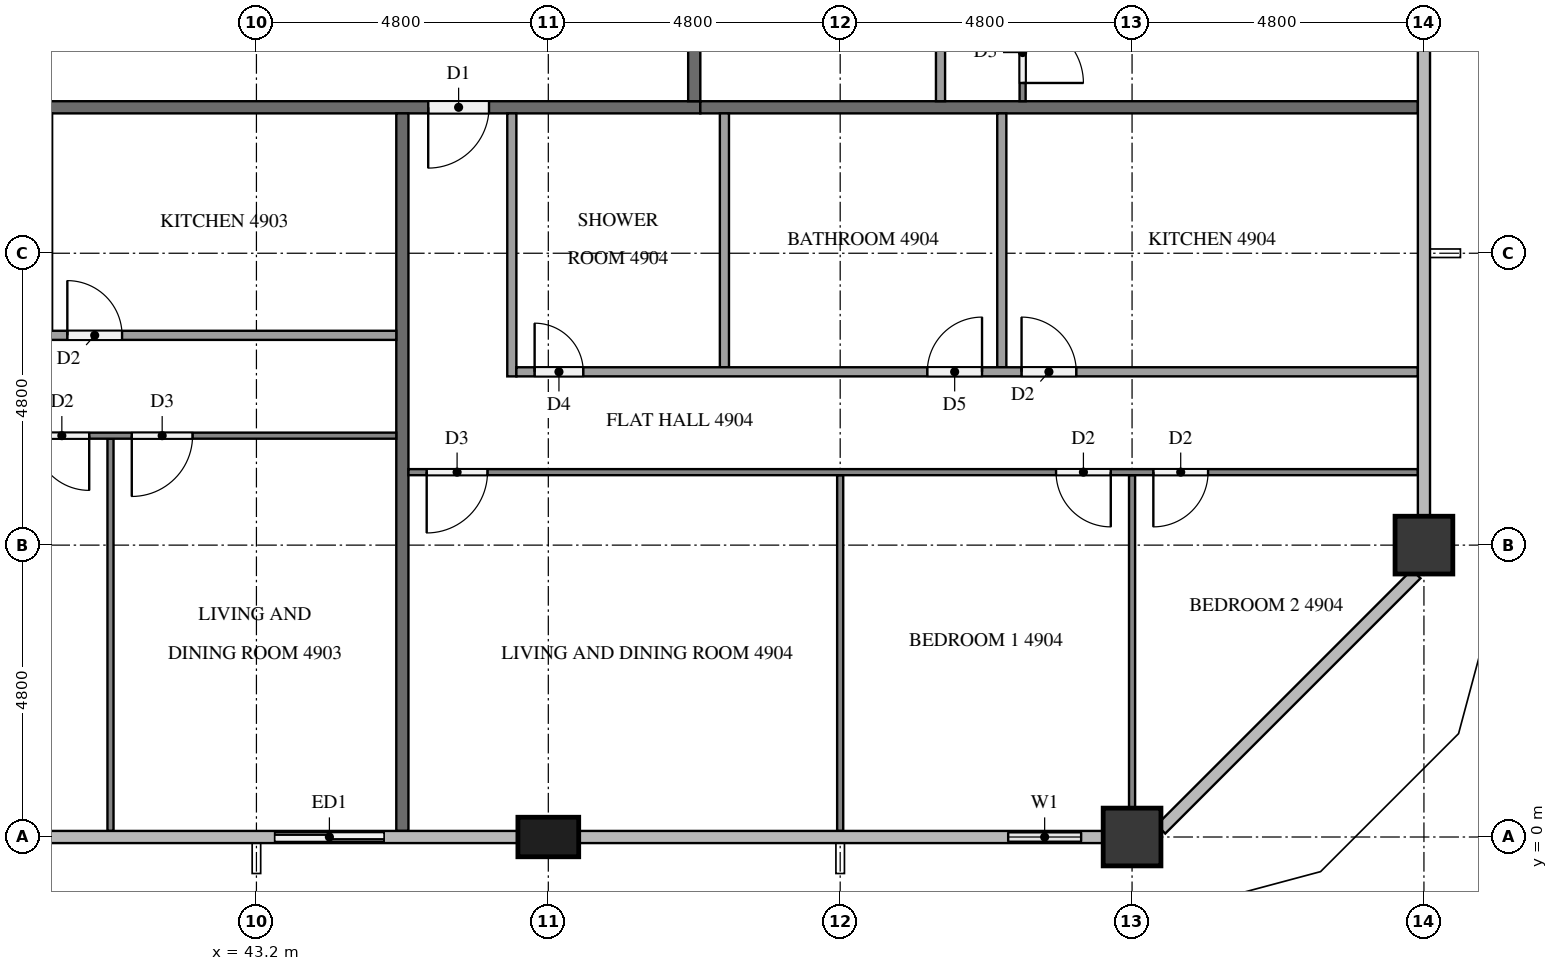
"""IFC4 building model, lengths in metres.
Left out: names, types, materials, properties, quantities, classifications, styles, units other than length and angle.
Written with IfcOpenShell. Run it as: python <this file> out.ifc"""

import sys

from ifc_helpers import new_model, si_unit, direction, frame, frame_2d, origin, origin_2d, place, context, subcontext, project, spatial, rectangle, extrude, element, fill, save


model = new_model("IFC4")
c1 = context("Model", 3, precision=1e-05, world=origin(), true_north=direction((0.0, 1.0)))
c2 = subcontext(c1, "Body", "Model", "MODEL_VIEW")
j1 = project(units=[si_unit("LENGTHUNIT", "METRE"), si_unit("PLANEANGLEUNIT", "RADIAN")], contexts=[c1])
p1 = place(None, origin())
s1 = spatial("IfcSite", under=j1, at=p1, CompositionType="ELEMENT")
p2 = place(p1, origin())
s2 = spatial("IfcBuilding", under=s1, at=p2, CompositionType="ELEMENT")
p3 = place(p2, frame((0.0, 0.0, 189.4)))
s3 = spatial("IfcBuildingStorey", under=s2, at=p3, CompositionType="ELEMENT", Elevation=189.4)
p4 = place(p3, frame((48.0, 0.0, 0.0), z_axis=(0.0, 0.0, 1.0), x_axis=(1.0, 0.0, 0.0)))
e1 = element("IfcColumn", 1, at=p4, inside=s3, PredefinedType="COLUMN", context=c2, shape_type="SweptSolid", body=[
    extrude(rectangle(XDim=1.0, YDim=0.65, at=origin_2d()), origin(), (0.0, 0.0, 1.0), 3.2),
])
for number, where, z_axis, x_axis in (
    (2, (57.6, 0.0, 0.0), (0.0, 0.0, 1.0), (1.0, 0.0, 0.0)),
    (3, (62.4, 4.8, 0.0), (0.0, 0.0, 1.0), (1.0, 0.0, 0.0)),
):
    element("IfcColumn", number, at=place(p3, frame(where, z_axis=z_axis, x_axis=x_axis)), inside=s3, PredefinedType="COLUMN", context=c2, shape_type="SweptSolid", body=[
        extrude(rectangle(XDim=0.95, YDim=0.95, at=origin_2d()), origin(), (0.0, 0.0, 1.0), 3.2),
    ])
p5 = place(p3, frame((43.2, 0.0, 0.0), z_axis=(0.0, 0.0, 1.0), x_axis=(1.0, 0.0, 0.0)))
e4 = element("IfcWall", 4, at=p5, inside=s3, PredefinedType="SOLIDWALL", context=c2, shape_type="SweptSolid", body=[
    extrude(rectangle(XDim=2.4, YDim=0.15, at=frame_2d((1.2, 0.0))), origin(), (0.0, 0.0, 1.0), 3.2),
])
p6 = place(p5, frame((0.3, 0.0, 0.0)))
e5 = element("IfcOpeningElement", 5, at=p6, cuts=e4, PredefinedType="OPENING", context=c2, shape_type="SweptSolid", body=[
    extrude(rectangle(XDim=1.8, YDim=2.4, at=frame_2d((0.9, 1.2))), frame((0.0, 0.085, 0.0), z_axis=(0.0, -1.0, 0.0), x_axis=(1.0, 0.0, 0.0)), (0.0, 0.0, 1.0), 0.17),
])
p7 = place(p3, frame((55.2, 0.0, 0.0), z_axis=(0.0, 0.0, 1.0), x_axis=(1.0, 0.0, 0.0)))
e6 = element("IfcWall", 6, at=p7, inside=s3, PredefinedType="SOLIDWALL", context=c2, shape_type="SweptSolid", body=[
    extrude(rectangle(XDim=1.925, YDim=0.15, at=frame_2d((0.962, 0.0))), origin(), (0.0, 0.0, 1.0), 3.2),
])
p8 = place(p7, frame((0.363, 0.0, 0.9)))
e7 = element("IfcOpeningElement", 7, at=p8, cuts=e6, PredefinedType="OPENING", context=c2, shape_type="SweptSolid", body=[
    extrude(rectangle(XDim=1.2, YDim=1.4, at=frame_2d((0.6, 0.7))), frame((0.0, 0.085, 0.0), z_axis=(0.0, -1.0, 0.0), x_axis=(1.0, 0.0, 0.0)), (0.0, 0.0, 1.0), 0.17),
])
p9 = place(p3, frame((50.5, 12.0, 0.0), z_axis=(0.0, 0.0, 1.0), x_axis=(-1.0, 0.0, 0.0)))
e8 = element("IfcWall", 8, at=p9, inside=s3, PredefinedType="PARTITIONING", context=c2, shape_type="SweptSolid", body=[
    extrude(rectangle(XDim=38.6, YDim=0.2, at=frame_2d((19.3, 0.0))), origin(), (0.0, 0.0, 1.0), 3.2),
])
p10 = place(p9, frame((31.725, 0.0, 0.0)))
e9 = element("IfcOpeningElement", 9, at=p10, cuts=e8, PredefinedType="OPENING", context=c2, shape_type="SweptSolid", body=[
    extrude(rectangle(XDim=1.0, YDim=2.1, at=frame_2d((0.5, 1.05))), frame((0.0, 0.11, 0.0), z_axis=(0.0, -1.0, 0.0), x_axis=(1.0, 0.0, 0.0)), (0.0, 0.0, 1.0), 0.22),
])
p11 = place(p9, frame((19.725, 0.0, 0.0)))
e10 = element("IfcOpeningElement", 10, at=p11, cuts=e8, PredefinedType="OPENING", context=c2, shape_type="SweptSolid", body=[
    extrude(rectangle(XDim=1.0, YDim=2.1, at=frame_2d((0.5, 1.05))), frame((0.0, 0.11, 0.0), z_axis=(0.0, -1.0, 0.0), x_axis=(1.0, 0.0, 0.0)), (0.0, 0.0, 1.0), 0.22),
])
p12 = place(p9, frame((17.875, 0.0, 0.0)))
e11 = element("IfcOpeningElement", 11, at=p12, cuts=e8, PredefinedType="OPENING", context=c2, shape_type="SweptSolid", body=[
    extrude(rectangle(XDim=1.0, YDim=2.1, at=frame_2d((0.5, 1.05))), frame((0.0, 0.11, 0.0), z_axis=(0.0, -1.0, 0.0), x_axis=(1.0, 0.0, 0.0)), (0.0, 0.0, 1.0), 0.22),
])
p13 = place(p9, frame((3.475, 0.0, 0.0)))
e12 = element("IfcOpeningElement", 12, at=p13, cuts=e8, PredefinedType="OPENING", context=c2, shape_type="SweptSolid", body=[
    extrude(rectangle(XDim=1.0, YDim=2.1, at=frame_2d((0.5, 1.05))), frame((0.0, 0.11, 0.0), z_axis=(0.0, -1.0, 0.0), x_axis=(1.0, 0.0, 0.0)), (0.0, 0.0, 1.0), 0.22),
])
p14 = place(p3, frame((50.4, 40.7, 0.0), z_axis=(0.0, 0.0, 1.0), x_axis=(0.0, -1.0, 0.0)))
e13 = element("IfcWall", 13, at=p14, inside=s3, PredefinedType="PARTITIONING", context=c2, shape_type="SweptSolid", body=[
    extrude(rectangle(XDim=28.6, YDim=0.2, at=frame_2d((14.3, 0.0))), origin(), (0.0, 0.0, 1.0), 3.2),
])
p15 = place(p14, frame((21.925, 0.0, 0.0)))
e14 = element("IfcOpeningElement", 14, at=p15, cuts=e13, PredefinedType="OPENING", context=c2, shape_type="SweptSolid", body=[
    extrude(rectangle(XDim=1.0, YDim=2.1, at=frame_2d((0.5, 1.05))), frame((0.0, 0.11, 0.0), z_axis=(0.0, -1.0, 0.0), x_axis=(1.0, 0.0, 0.0)), (0.0, 0.0, 1.0), 0.22),
])
p16 = place(p14, frame((20.075, 0.0, 0.0)))
e15 = element("IfcOpeningElement", 15, at=p16, cuts=e13, PredefinedType="OPENING", context=c2, shape_type="SweptSolid", body=[
    extrude(rectangle(XDim=1.0, YDim=2.1, at=frame_2d((0.5, 1.05))), frame((0.0, 0.11, 0.0), z_axis=(0.0, -1.0, 0.0), x_axis=(1.0, 0.0, 0.0)), (0.0, 0.0, 1.0), 0.22),
])
p17 = place(p14, frame((0.325, 0.0, 0.0)))
e16 = element("IfcOpeningElement", 16, at=p17, cuts=e13, PredefinedType="OPENING", context=c2, shape_type="SweptSolid", body=[
    extrude(rectangle(XDim=1.0, YDim=2.1, at=frame_2d((0.5, 1.05))), frame((0.0, 0.11, 0.0), z_axis=(0.0, -1.0, 0.0), x_axis=(1.0, 0.0, 0.0)), (0.0, 0.0, 1.0), 0.22),
])
p18 = place(p3, frame((45.6, 11.9, 0.0), z_axis=(0.0, 0.0, 1.0), x_axis=(0.0, -1.0, 0.0)))
e17 = element("IfcWall", 17, at=p18, inside=s3, PredefinedType="PARTITIONING", context=c2, shape_type="SweptSolid", body=[
    extrude(rectangle(XDim=11.8, YDim=0.2, at=frame_2d((5.9, 0.0))), origin(), (0.0, 0.0, 1.0), 3.2),
])
p19 = place(p3, frame((50.5, 12.0, 0.0), z_axis=(0.0, 0.0, 1.0), x_axis=(1.0, 0.0, 0.0)))
e18 = element("IfcWall", 18, at=p19, inside=s3, PredefinedType="PARTITIONING", context=c2, shape_type="SweptSolid", body=[
    extrude(rectangle(XDim=11.8, YDim=0.2, at=frame_2d((5.9, 0.0))), origin(), (0.0, 0.0, 1.0), 3.2),
])
p20 = place(p3, frame((40.8, 6.55, 0.0), z_axis=(0.0, 0.0, 1.0), x_axis=(0.0, -1.0, 0.0)))
e19 = element("IfcWall", 19, at=p20, inside=s3, PredefinedType="PARTITIONING", context=c2, shape_type="SweptSolid", body=[
    extrude(rectangle(XDim=6.45, YDim=0.1, at=frame_2d((3.225, 0.0))), origin(), (0.0, 0.0, 1.0), 3.2),
])
p21 = place(p3, frame((45.5, 6.6, 0.0), z_axis=(0.0, 0.0, 1.0), x_axis=(-1.0, 0.0, 0.0)))
e20 = element("IfcWall", 20, at=p21, inside=s3, PredefinedType="PARTITIONING", context=c2, shape_type="SweptSolid", body=[
    extrude(rectangle(XDim=14.2, YDim=0.1, at=frame_2d((7.1, 0.0))), origin(), (0.0, 0.0, 1.0), 3.2),
])
p22 = place(p21, frame((13.0, 0.0, 0.0)))
e21 = element("IfcOpeningElement", 21, at=p22, cuts=e20, PredefinedType="OPENING", context=c2, shape_type="SweptSolid", body=[
    extrude(rectangle(XDim=0.9, YDim=2.1, at=frame_2d((0.45, 1.05))), frame((0.0, 0.06, 0.0), z_axis=(0.0, -1.0, 0.0), x_axis=(1.0, 0.0, 0.0)), (0.0, 0.0, 1.0), 0.12),
])
p23 = place(p21, frame((5.05, 0.0, 0.0)))
e22 = element("IfcOpeningElement", 22, at=p23, cuts=e20, PredefinedType="OPENING", context=c2, shape_type="SweptSolid", body=[
    extrude(rectangle(XDim=0.9, YDim=2.1, at=frame_2d((0.45, 1.05))), frame((0.0, 0.06, 0.0), z_axis=(0.0, -1.0, 0.0), x_axis=(1.0, 0.0, 0.0)), (0.0, 0.0, 1.0), 0.12),
])
p24 = place(p21, frame((3.35, 0.0, 0.0)))
e23 = element("IfcOpeningElement", 23, at=p24, cuts=e20, PredefinedType="OPENING", context=c2, shape_type="SweptSolid", body=[
    extrude(rectangle(XDim=1.0, YDim=2.1, at=frame_2d((0.5, 1.05))), frame((0.0, 0.06, 0.0), z_axis=(0.0, -1.0, 0.0), x_axis=(1.0, 0.0, 0.0)), (0.0, 0.0, 1.0), 0.12),
])
p25 = place(p3, frame((33.075, 8.25, 0.0), z_axis=(0.0, 0.0, 1.0), x_axis=(1.0, 0.0, 0.0)))
e24 = element("IfcWall", 24, at=p25, inside=s3, PredefinedType="PARTITIONING", context=c2, shape_type="SweptSolid", body=[
    extrude(rectangle(XDim=12.425, YDim=0.15, at=frame_2d((6.212, 0.0))), origin(), (0.0, 0.0, 1.0), 3.2),
])
p26 = place(p25, frame((0.3, 0.0, 0.0)))
e25 = element("IfcOpeningElement", 25, at=p26, cuts=e24, PredefinedType="OPENING", context=c2, shape_type="SweptSolid", body=[
    extrude(rectangle(XDim=0.9, YDim=2.1, at=frame_2d((0.45, 1.05))), frame((0.0, 0.085, 0.0), z_axis=(0.0, -1.0, 0.0), x_axis=(1.0, 0.0, 0.0)), (0.0, 0.0, 1.0), 0.17),
])
p27 = place(p25, frame((5.565, 0.0, 0.0)))
e26 = element("IfcOpeningElement", 26, at=p27, cuts=e24, PredefinedType="OPENING", context=c2, shape_type="SweptSolid", body=[
    extrude(rectangle(XDim=0.8, YDim=2.1, at=frame_2d((0.4, 1.05))), frame((0.0, 0.085, 0.0), z_axis=(0.0, -1.0, 0.0), x_axis=(1.0, 0.0, 0.0)), (0.0, 0.0, 1.0), 0.17),
])
p28 = place(p25, frame((7.015, 0.0, 0.0)))
e27 = element("IfcOpeningElement", 27, at=p28, cuts=e24, PredefinedType="OPENING", context=c2, shape_type="SweptSolid", body=[
    extrude(rectangle(XDim=0.9, YDim=2.1, at=frame_2d((0.45, 1.05))), frame((0.0, 0.085, 0.0), z_axis=(0.0, -1.0, 0.0), x_axis=(1.0, 0.0, 0.0)), (0.0, 0.0, 1.0), 0.17),
])
p29 = place(p3, frame((52.8, 5.95, 0.0), z_axis=(0.0, 0.0, 1.0), x_axis=(0.0, -1.0, 0.0)))
e28 = element("IfcWall", 28, at=p29, inside=s3, PredefinedType="PARTITIONING", context=c2, shape_type="SweptSolid", body=[
    extrude(rectangle(XDim=5.85, YDim=0.1, at=frame_2d((2.925, 0.0))), origin(), (0.0, 0.0, 1.0), 3.2),
])
p30 = place(p3, frame((57.6, 5.95, 0.0), z_axis=(0.0, 0.0, 1.0), x_axis=(0.0, -1.0, 0.0)))
e29 = element("IfcWall", 29, at=p30, inside=s3, PredefinedType="PARTITIONING", context=c2, shape_type="SweptSolid", body=[
    extrude(rectangle(XDim=5.475, YDim=0.1, at=frame_2d((2.737, 0.0))), origin(), (0.0, 0.0, 1.0), 3.2),
])
p31 = place(p3, frame((62.3, 6.0, 0.0), z_axis=(0.0, 0.0, 1.0), x_axis=(-1.0, 0.0, 0.0)))
e30 = element("IfcWall", 30, at=p31, inside=s3, PredefinedType="PARTITIONING", context=c2, shape_type="SweptSolid", body=[
    extrude(rectangle(XDim=16.6, YDim=0.1, at=frame_2d((8.3, 0.0))), origin(), (0.0, 0.0, 1.0), 3.2),
])
p32 = place(p31, frame((15.3, 0.0, 0.0)))
e31 = element("IfcOpeningElement", 31, at=p32, cuts=e30, PredefinedType="OPENING", context=c2, shape_type="SweptSolid", body=[
    extrude(rectangle(XDim=1.0, YDim=2.1, at=frame_2d((0.5, 1.05))), frame((0.0, 0.06, 0.0), z_axis=(0.0, -1.0, 0.0), x_axis=(1.0, 0.0, 0.0)), (0.0, 0.0, 1.0), 0.12),
])
p33 = place(p31, frame((5.05, 0.0, 0.0)))
e32 = element("IfcOpeningElement", 32, at=p33, cuts=e30, PredefinedType="OPENING", context=c2, shape_type="SweptSolid", body=[
    extrude(rectangle(XDim=0.9, YDim=2.1, at=frame_2d((0.45, 1.05))), frame((0.0, 0.06, 0.0), z_axis=(0.0, -1.0, 0.0), x_axis=(1.0, 0.0, 0.0)), (0.0, 0.0, 1.0), 0.12),
])
p34 = place(p31, frame((3.45, 0.0, 0.0)))
e33 = element("IfcOpeningElement", 33, at=p34, cuts=e30, PredefinedType="OPENING", context=c2, shape_type="SweptSolid", body=[
    extrude(rectangle(XDim=0.9, YDim=2.1, at=frame_2d((0.45, 1.05))), frame((0.0, 0.06, 0.0), z_axis=(0.0, -1.0, 0.0), x_axis=(1.0, 0.0, 0.0)), (0.0, 0.0, 1.0), 0.12),
])
for number, where, z_axis, x_axis in (
    (34, (50.896, 11.9, 0.0), (0.0, 0.0, 1.0), (0.0, -1.0, 0.0)),
    (35, (55.458, 11.9, 0.0), (0.0, 0.0, 1.0), (0.0, -1.0, 0.0)),
):
    element("IfcWall", number, at=place(p3, frame(where, z_axis=z_axis, x_axis=x_axis)), inside=s3, PredefinedType="PARTITIONING", context=c2, shape_type="SweptSolid", body=[
        extrude(rectangle(XDim=4.175, YDim=0.15, at=frame_2d((2.087, 0.0))), origin(), (0.0, 0.0, 1.0), 3.2),
    ])
p35 = place(p3, frame((47.4, 11.9, 0.0), z_axis=(0.0, 0.0, 1.0), x_axis=(0.0, -1.0, 0.0)))
e36 = element("IfcWall", 36, at=p35, inside=s3, PredefinedType="PARTITIONING", context=c2, shape_type="SweptSolid", body=[
    extrude(rectangle(XDim=4.325, YDim=0.15, at=frame_2d((2.163, 0.0))), origin(), (0.0, 0.0, 1.0), 3.2),
])
p36 = place(p3, frame((47.475, 7.65, 0.0), z_axis=(0.0, 0.0, 1.0), x_axis=(1.0, 0.0, 0.0)))
e37 = element("IfcWall", 37, at=p36, inside=s3, PredefinedType="PARTITIONING", context=c2, shape_type="SweptSolid", body=[
    extrude(rectangle(XDim=14.825, YDim=0.15, at=frame_2d((7.413, 0.0))), origin(), (0.0, 0.0, 1.0), 3.2),
])
p37 = place(p36, frame((0.3, 0.0, 0.0)))
e38 = element("IfcOpeningElement", 38, at=p37, cuts=e37, PredefinedType="OPENING", context=c2, shape_type="SweptSolid", body=[
    extrude(rectangle(XDim=0.8, YDim=2.1, at=frame_2d((0.4, 1.05))), frame((0.0, 0.085, 0.0), z_axis=(0.0, -1.0, 0.0), x_axis=(1.0, 0.0, 0.0)), (0.0, 0.0, 1.0), 0.17),
])
p38 = place(p36, frame((6.758, 0.0, 0.0)))
e39 = element("IfcOpeningElement", 39, at=p38, cuts=e37, PredefinedType="OPENING", context=c2, shape_type="SweptSolid", body=[
    extrude(rectangle(XDim=0.9, YDim=2.1, at=frame_2d((0.45, 1.05))), frame((0.0, 0.085, 0.0), z_axis=(0.0, -1.0, 0.0), x_axis=(1.0, 0.0, 0.0)), (0.0, 0.0, 1.0), 0.17),
])
p39 = place(p36, frame((8.308, 0.0, 0.0)))
e40 = element("IfcOpeningElement", 40, at=p39, cuts=e37, PredefinedType="OPENING", context=c2, shape_type="SweptSolid", body=[
    extrude(rectangle(XDim=0.9, YDim=2.1, at=frame_2d((0.45, 1.05))), frame((0.0, 0.085, 0.0), z_axis=(0.0, -1.0, 0.0), x_axis=(1.0, 0.0, 0.0)), (0.0, 0.0, 1.0), 0.17),
])
p40 = place(p3, frame((55.8, 19.1, 0.0), z_axis=(0.0, 0.0, 1.0), x_axis=(0.0, -1.0, 0.0)))
e41 = element("IfcWall", 41, at=p40, inside=s3, PredefinedType="PARTITIONING", context=c2, shape_type="SweptSolid", body=[
    extrude(rectangle(XDim=7.0, YDim=0.1, at=frame_2d((3.5, 0.0))), origin(), (0.0, 0.0, 1.0), 3.2),
])
p41 = place(p40, frame((5.7, 0.0, 0.0)))
e42 = element("IfcOpeningElement", 42, at=p41, cuts=e41, PredefinedType="OPENING", context=c2, shape_type="SweptSolid", body=[
    extrude(rectangle(XDim=1.0, YDim=2.1, at=frame_2d((0.5, 1.05))), frame((0.0, 0.06, 0.0), z_axis=(0.0, -1.0, 0.0), x_axis=(1.0, 0.0, 0.0)), (0.0, 0.0, 1.0), 0.12),
])
p42 = place(p3, frame((54.45, 12.1, 0.0), z_axis=(0.0, 0.0, 1.0), x_axis=(0.0, 1.0, 0.0)))
e43 = element("IfcWall", 43, at=p42, inside=s3, PredefinedType="PARTITIONING", context=c2, shape_type="SweptSolid", body=[
    extrude(rectangle(XDim=5.225, YDim=0.15, at=frame_2d((2.612, 0.0))), origin(), (0.0, 0.0, 1.0), 3.2),
])
p43 = place(p42, frame((3.46, 0.0, 0.0)))
e44 = element("IfcOpeningElement", 44, at=p43, cuts=e43, PredefinedType="OPENING", context=c2, shape_type="SweptSolid", body=[
    extrude(rectangle(XDim=0.8, YDim=2.1, at=frame_2d((0.4, 1.05))), frame((0.0, 0.085, 0.0), z_axis=(0.0, -1.0, 0.0), x_axis=(1.0, 0.0, 0.0)), (0.0, 0.0, 1.0), 0.17),
])
p44 = place(p42, frame((1.91, 0.0, 0.0)))
e45 = element("IfcOpeningElement", 45, at=p44, cuts=e43, PredefinedType="OPENING", context=c2, shape_type="SweptSolid", body=[
    extrude(rectangle(XDim=0.9, YDim=2.1, at=frame_2d((0.45, 1.05))), frame((0.0, 0.085, 0.0), z_axis=(0.0, -1.0, 0.0), x_axis=(1.0, 0.0, 0.0)), (0.0, 0.0, 1.0), 0.17),
])
p45 = place(p6, origin())
e46 = element("IfcDoor", 46, at=p45, inside=s3, OperationType="SLIDING_TO_LEFT", PredefinedType="DOOR", context=c2, shape_type="SweptSolid", body=[
    extrude(rectangle(XDim=1.8, YDim=2.4, at=frame_2d((0.9, 1.2))), frame((0.0, 0.025, 0.0), z_axis=(0.0, -1.0, 0.0), x_axis=(1.0, 0.0, 0.0)), (0.0, 0.0, 1.0), 0.05),
])
fill(e5, e46)
p46 = place(p8, origin())
e47 = element("IfcWindow", 47, at=p46, inside=s3, PartitioningType="SINGLE_PANEL", PredefinedType="WINDOW", context=c2, shape_type="SweptSolid", body=[
    extrude(rectangle(XDim=1.2, YDim=1.4, at=frame_2d((0.6, 0.7))), frame((0.0, 0.03, 0.0), z_axis=(0.0, -1.0, 0.0), x_axis=(1.0, 0.0, 0.0)), (0.0, 0.0, 1.0), 0.06),
])
fill(e7, e47)
p47 = place(p13, origin())
e48 = element("IfcDoor", 48, at=p47, inside=s3, OperationType="SINGLE_SWING_RIGHT", PredefinedType="DOOR", context=c2, shape_type="SweptSolid", body=[
    extrude(rectangle(XDim=1.0, YDim=2.1, at=frame_2d((0.5, 1.05))), frame((0.0, 0.025, 0.0), z_axis=(0.0, -1.0, 0.0), x_axis=(1.0, 0.0, 0.0)), (0.0, 0.0, 1.0), 0.05),
])
fill(e12, e48)
p48 = place(p23, origin())
e49 = element("IfcDoor", 49, at=p48, inside=s3, OperationType="SINGLE_SWING_LEFT", PredefinedType="DOOR", context=c2, shape_type="SweptSolid", body=[
    extrude(rectangle(XDim=0.9, YDim=2.1, at=frame_2d((0.45, 1.05))), frame((0.0, 0.025, 0.0), z_axis=(0.0, -1.0, 0.0), x_axis=(1.0, 0.0, 0.0)), (0.0, 0.0, 1.0), 0.05),
])
fill(e22, e49)
p49 = place(p24, origin())
e50 = element("IfcDoor", 50, at=p49, inside=s3, OperationType="SINGLE_SWING_RIGHT", PredefinedType="DOOR", context=c2, shape_type="SweptSolid", body=[
    extrude(rectangle(XDim=1.0, YDim=2.1, at=frame_2d((0.5, 1.05))), frame((0.0, 0.025, 0.0), z_axis=(0.0, -1.0, 0.0), x_axis=(1.0, 0.0, 0.0)), (0.0, 0.0, 1.0), 0.05),
])
fill(e23, e50)
p50 = place(p28, origin())
e51 = element("IfcDoor", 51, at=p50, inside=s3, OperationType="SINGLE_SWING_LEFT", PredefinedType="DOOR", context=c2, shape_type="SweptSolid", body=[
    extrude(rectangle(XDim=0.9, YDim=2.1, at=frame_2d((0.45, 1.05))), frame((0.0, 0.025, 0.0), z_axis=(0.0, -1.0, 0.0), x_axis=(1.0, 0.0, 0.0)), (0.0, 0.0, 1.0), 0.05),
])
fill(e27, e51)
p51 = place(p32, origin())
e52 = element("IfcDoor", 52, at=p51, inside=s3, OperationType="SINGLE_SWING_RIGHT", PredefinedType="DOOR", context=c2, shape_type="SweptSolid", body=[
    extrude(rectangle(XDim=1.0, YDim=2.1, at=frame_2d((0.5, 1.05))), frame((0.0, 0.025, 0.0), z_axis=(0.0, -1.0, 0.0), x_axis=(1.0, 0.0, 0.0)), (0.0, 0.0, 1.0), 0.05),
])
fill(e31, e52)
p52 = place(p33, origin())
e53 = element("IfcDoor", 53, at=p52, inside=s3, OperationType="SINGLE_SWING_LEFT", PredefinedType="DOOR", context=c2, shape_type="SweptSolid", body=[
    extrude(rectangle(XDim=0.9, YDim=2.1, at=frame_2d((0.45, 1.05))), frame((0.0, 0.025, 0.0), z_axis=(0.0, -1.0, 0.0), x_axis=(1.0, 0.0, 0.0)), (0.0, 0.0, 1.0), 0.05),
])
fill(e32, e53)
p53 = place(p34, origin())
e54 = element("IfcDoor", 54, at=p53, inside=s3, OperationType="SINGLE_SWING_RIGHT", PredefinedType="DOOR", context=c2, shape_type="SweptSolid", body=[
    extrude(rectangle(XDim=0.9, YDim=2.1, at=frame_2d((0.45, 1.05))), frame((0.0, 0.025, 0.0), z_axis=(0.0, -1.0, 0.0), x_axis=(1.0, 0.0, 0.0)), (0.0, 0.0, 1.0), 0.05),
])
fill(e33, e54)
p54 = place(p37, origin())
e55 = element("IfcDoor", 55, at=p54, inside=s3, OperationType="SINGLE_SWING_LEFT", PredefinedType="DOOR", context=c2, shape_type="SweptSolid", body=[
    extrude(rectangle(XDim=0.8, YDim=2.1, at=frame_2d((0.4, 1.05))), frame((0.0, 0.025, 0.0), z_axis=(0.0, -1.0, 0.0), x_axis=(1.0, 0.0, 0.0)), (0.0, 0.0, 1.0), 0.05),
])
fill(e38, e55)
p55 = place(p38, origin())
e56 = element("IfcDoor", 56, at=p55, inside=s3, OperationType="SINGLE_SWING_RIGHT", PredefinedType="DOOR", context=c2, shape_type="SweptSolid", body=[
    extrude(rectangle(XDim=0.9, YDim=2.1, at=frame_2d((0.45, 1.05))), frame((0.0, 0.025, 0.0), z_axis=(0.0, -1.0, 0.0), x_axis=(1.0, 0.0, 0.0)), (0.0, 0.0, 1.0), 0.05),
])
fill(e39, e56)
p56 = place(p39, origin())
e57 = element("IfcDoor", 57, at=p56, inside=s3, OperationType="SINGLE_SWING_LEFT", PredefinedType="DOOR", context=c2, shape_type="SweptSolid", body=[
    extrude(rectangle(XDim=0.9, YDim=2.1, at=frame_2d((0.45, 1.05))), frame((0.0, 0.025, 0.0), z_axis=(0.0, -1.0, 0.0), x_axis=(1.0, 0.0, 0.0)), (0.0, 0.0, 1.0), 0.05),
])
fill(e40, e57)
p57 = place(p41, origin())
e58 = element("IfcDoor", 58, at=p57, inside=s3, OperationType="SINGLE_SWING_RIGHT", PredefinedType="DOOR", context=c2, shape_type="SweptSolid", body=[
    extrude(rectangle(XDim=1.0, YDim=2.1, at=frame_2d((0.5, 1.05))), frame((0.0, 0.025, 0.0), z_axis=(0.0, -1.0, 0.0), x_axis=(1.0, 0.0, 0.0)), (0.0, 0.0, 1.0), 0.05),
])
fill(e42, e58)
save(model, sys.argv[1])
